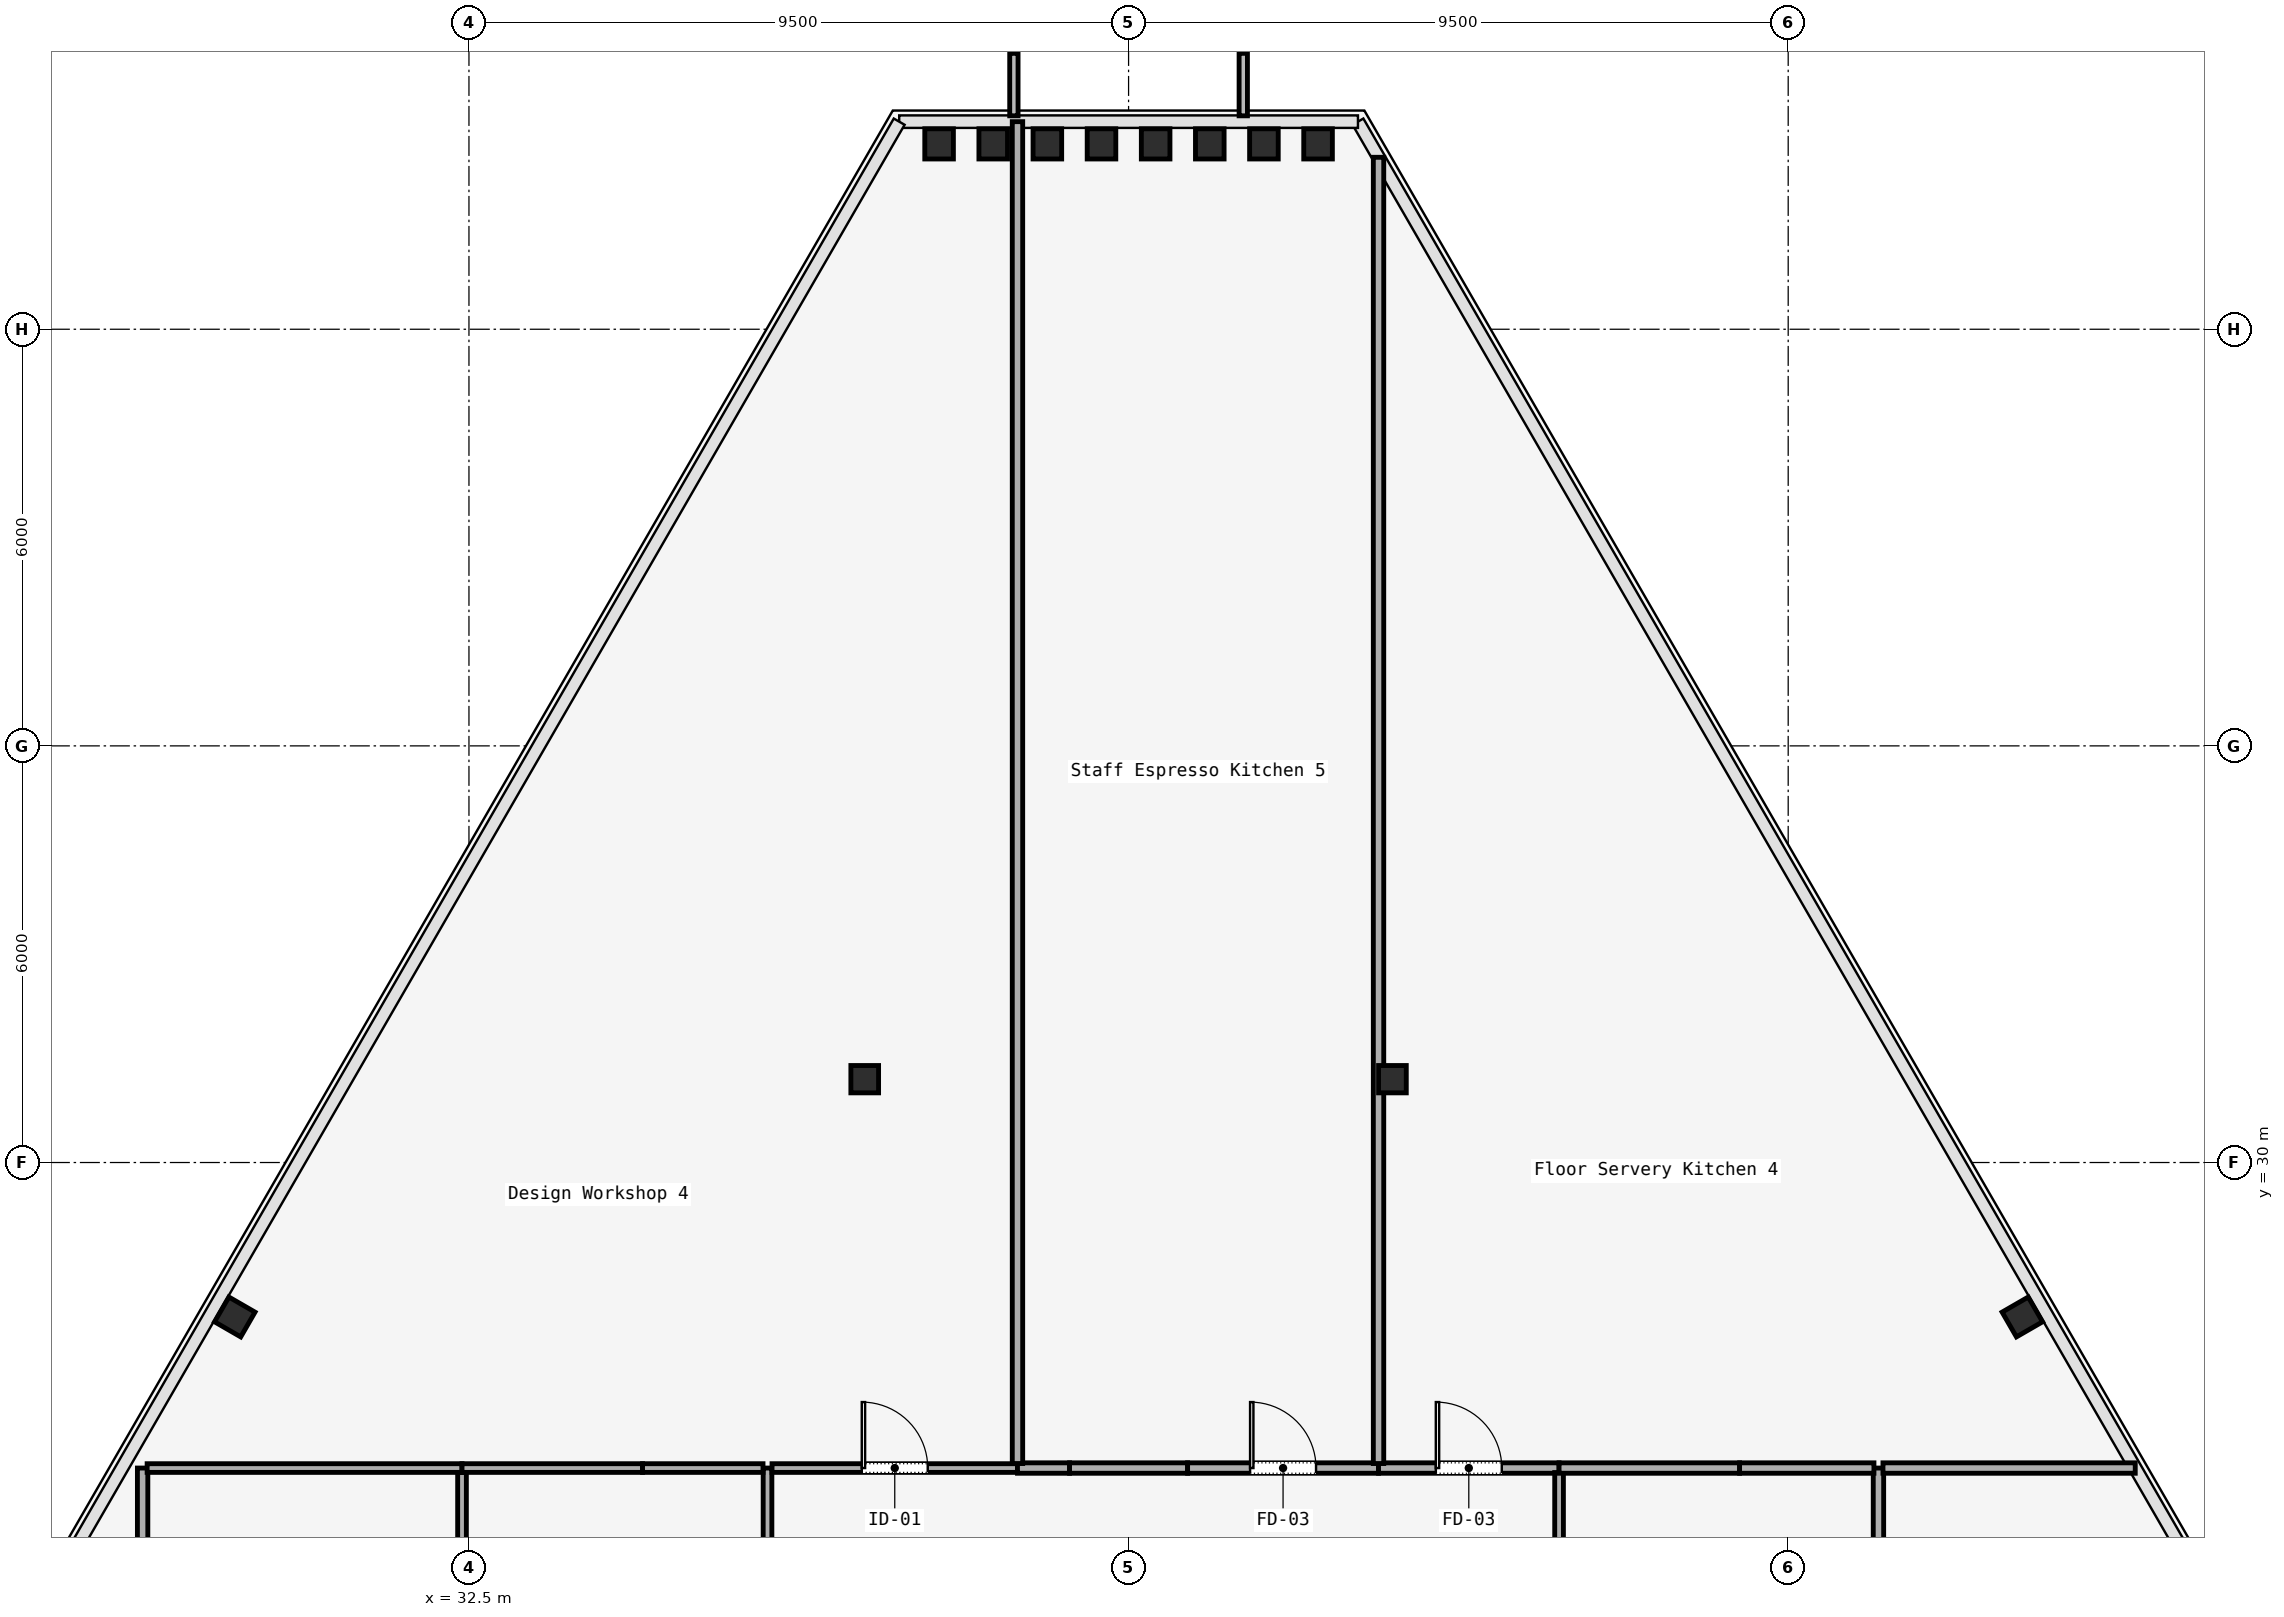
"""IFC4 building model, lengths in metres.
Left out: names, types, materials, properties, quantities, classifications, styles, units other than length and angle.
Written with IfcOpenShell. Run it as: python <this file> out.ifc"""

import sys

from ifc_helpers import new_model, si_unit, direction, frame, frame_2d, origin, origin_2d, place, context, subcontext, project, spatial, rectangle, i_section, extrude, element, fill, save


model = new_model("IFC4")
c1 = context("Model", 3, precision=1e-05, world=origin(), true_north=direction((0.0, 1.0)))
c2 = subcontext(c1, "Body", "Model", "MODEL_VIEW")
j1 = project(units=[si_unit("LENGTHUNIT", "METRE"), si_unit("PLANEANGLEUNIT", "RADIAN")], contexts=[c1])
p1 = place(None, origin())
s1 = spatial("IfcSite", under=j1, at=p1, CompositionType="ELEMENT")
p2 = place(p1, origin())
s2 = spatial("IfcBuilding", under=s1, at=p2, CompositionType="ELEMENT")
p3 = place(p2, frame((0.0, 0.0, 240.8)))
s3 = spatial("IfcBuildingStorey", under=s2, at=p3, CompositionType="ELEMENT", Elevation=240.8)
for number, where, z_axis, x_axis in (
    (1, (38.2, 31.2, 0.0), (0.0, 0.0, 1.0), (1.0, 0.0, 0.0)),
    (2, (45.8, 31.2, 0.0), (0.0, 0.0, 1.0), (1.0, 0.0, 0.0)),
):
    element("IfcColumn", number, at=place(p3, frame(where, z_axis=z_axis, x_axis=x_axis)), inside=s3, PredefinedType="COLUMN", context=c2, shape_type="SweptSolid", body=[
        extrude(i_section(OverallWidth=0.399, OverallDepth=0.394, WebThickness=0.023, FlangeThickness=0.037, FilletRadius=0.015, at=origin_2d()), origin(), (0.0, 0.0, 1.0), 3.58),
    ])
for number, where, z_axis, x_axis in (
    (3, (54.873, 27.776, 0.0), (0.0, 0.0, 1.0), (-0.5, 0.866, 0.0)),
    (4, (44.729, 44.67, 0.0), (0.0, 0.0, 1.0), (1.0, 0.0, 0.0)),
    (5, (43.949, 44.67, 0.0), (0.0, 0.0, 1.0), (1.0, 0.0, 0.0)),
    (6, (43.17, 44.67, 0.0), (0.0, 0.0, 1.0), (1.0, 0.0, 0.0)),
    (7, (42.39, 44.67, 0.0), (0.0, 0.0, 1.0), (1.0, 0.0, 0.0)),
    (8, (41.61, 44.67, 0.0), (0.0, 0.0, 1.0), (1.0, 0.0, 0.0)),
    (9, (40.83, 44.67, 0.0), (0.0, 0.0, 1.0), (1.0, 0.0, 0.0)),
    (10, (40.051, 44.67, 0.0), (0.0, 0.0, 1.0), (1.0, 0.0, 0.0)),
    (11, (39.271, 44.67, 0.0), (0.0, 0.0, 1.0), (1.0, 0.0, 0.0)),
    (12, (29.127, 27.776, 0.0), (0.0, 0.0, 1.0), (0.5, 0.866, 0.0)),
):
    element("IfcColumn", number, at=place(p3, frame(where, z_axis=z_axis, x_axis=x_axis)), inside=s3, PredefinedType="COLUMN", context=c2, shape_type="SweptSolid", body=[
        extrude(i_section(OverallWidth=0.412, OverallDepth=0.435, WebThickness=0.036, FlangeThickness=0.044, FilletRadius=0.015, at=origin_2d()), origin(), (0.0, 0.0, 1.0), 3.58),
    ])
p4 = place(p3, frame((36.8, 23.965, 0.0), z_axis=(0.0, 0.0, 1.0), x_axis=(0.0, 1.0, 0.0)))
e13 = element("IfcWall", 13, at=p4, inside=s3, PredefinedType="PARTITIONING", context=c2, shape_type="SweptSolid", body=[
    extrude(rectangle(XDim=1.635, YDim=0.125, at=frame_2d((0.817, 0.0))), origin(), (0.0, 0.0, 1.0), 3.01),
])
p5 = place(p3, frame((36.865, 25.6, 0.0), z_axis=(0.0, 0.0, 1.0), x_axis=(1.0, 0.0, 0.0)))
e14 = element("IfcWall", 14, at=p5, inside=s3, PredefinedType="PARTITIONING", context=c2, shape_type="SweptSolid", body=[
    extrude(rectangle(XDim=3.535, YDim=0.125, at=frame_2d((1.768, 0.0))), origin(), (0.0, 0.0, 1.0), 3.01),
])
p6 = place(p5, frame((1.292, 0.0, 0.0)))
e15 = element("IfcOpeningElement", 15, at=p6, cuts=e14, PredefinedType="OPENING", context=c2, shape_type="SweptSolid", body=[
    extrude(rectangle(XDim=0.95, YDim=2.2, at=frame_2d((0.475, 1.1))), frame((0.0, 0.062, 0.0), z_axis=(0.0, -1.0, 0.0), x_axis=(1.0, 0.0, 0.0)), (0.0, 0.0, 1.0), 0.125),
])
p7 = place(p3, frame((40.4, 25.6, 0.0), z_axis=(0.0, 0.0, 1.0), x_axis=(1.0, 0.0, 0.0)))
e16 = element("IfcWall", 16, at=p7, inside=s3, PredefinedType="PARTITIONING", context=c2, shape_type="SweptSolid", body=[
    extrude(rectangle(XDim=0.75, YDim=0.15, at=frame_2d((0.375, 0.0))), origin(), (0.0, 0.0, 1.0), 3.01),
])
p8 = place(p3, frame((41.15, 25.6, 0.0), z_axis=(0.0, 0.0, 1.0), x_axis=(1.0, 0.0, 0.0)))
e17 = element("IfcWall", 17, at=p8, inside=s3, PredefinedType="PARTITIONING", context=c2, shape_type="SweptSolid", body=[
    extrude(rectangle(XDim=1.7, YDim=0.15, at=frame_2d((0.85, 0.0))), origin(), (0.0, 0.0, 1.0), 3.01),
])
p9 = place(p3, frame((42.85, 25.6, 0.0), z_axis=(0.0, 0.0, 1.0), x_axis=(1.0, 0.0, 0.0)))
e18 = element("IfcWall", 18, at=p9, inside=s3, PredefinedType="PARTITIONING", context=c2, shape_type="SweptSolid", body=[
    extrude(rectangle(XDim=2.75, YDim=0.15, at=frame_2d((1.375, 0.0))), origin(), (0.0, 0.0, 1.0), 3.01),
])
p10 = place(p9, frame((0.9, 0.0, 0.0)))
e19 = element("IfcOpeningElement", 19, at=p10, cuts=e18, PredefinedType="OPENING", context=c2, shape_type="SweptSolid", body=[
    extrude(rectangle(XDim=0.95, YDim=2.2, at=frame_2d((0.475, 1.1))), frame((0.0, 0.075, 0.0), z_axis=(0.0, -1.0, 0.0), x_axis=(1.0, 0.0, 0.0)), (0.0, 0.0, 1.0), 0.15),
])
p11 = place(p3, frame((45.6, 25.6, 0.0), z_axis=(0.0, 0.0, 1.0), x_axis=(1.0, 0.0, 0.0)))
e20 = element("IfcWall", 20, at=p11, inside=s3, PredefinedType="PARTITIONING", context=c2, shape_type="SweptSolid", body=[
    extrude(rectangle(XDim=2.6, YDim=0.15, at=frame_2d((1.3, 0.0))), origin(), (0.0, 0.0, 1.0), 3.01),
])
p12 = place(p11, frame((0.825, 0.0, 0.0)))
e21 = element("IfcOpeningElement", 21, at=p12, cuts=e20, PredefinedType="OPENING", context=c2, shape_type="SweptSolid", body=[
    extrude(rectangle(XDim=0.95, YDim=2.2, at=frame_2d((0.475, 1.1))), frame((0.0, 0.075, 0.0), z_axis=(0.0, -1.0, 0.0), x_axis=(1.0, 0.0, 0.0)), (0.0, 0.0, 1.0), 0.15),
])
p13 = place(p3, frame((48.2, 25.535, 0.0), z_axis=(0.0, 0.0, 1.0), x_axis=(0.0, -1.0, 0.0)))
e22 = element("IfcWall", 22, at=p13, inside=s3, PredefinedType="PARTITIONING", context=c2, shape_type="SweptSolid", body=[
    extrude(rectangle(XDim=1.635, YDim=0.125, at=frame_2d((0.817, 0.0))), origin(), (0.0, 0.0, 1.0), 3.01),
])
for number, where, z_axis, x_axis in (
    (23, (27.8, 25.6, 0.0), (0.0, 0.0, 1.0), (0.0, -1.0, 0.0)),
    (24, (52.8, 17.065, 0.0), (0.0, 0.0, 1.0), (0.0, 1.0, 0.0)),
):
    element("IfcWall", number, at=place(p3, frame(where, z_axis=z_axis, x_axis=x_axis)), inside=s3, PredefinedType="PARTITIONING", context=c2, shape_type="SweptSolid", body=[
        extrude(rectangle(XDim=8.535, YDim=0.15, at=frame_2d((4.268, 0.0))), origin(), (0.0, 0.0, 1.0), 3.01),
    ])
p14 = place(p3, frame((52.865, 25.6, 0.0), z_axis=(0.0, 0.0, 1.0), x_axis=(1.0, 0.0, 0.0)))
e25 = element("IfcWall", 25, at=p14, inside=s3, PredefinedType="PARTITIONING", context=c2, shape_type="SweptSolid", body=[
    extrude(rectangle(XDim=3.633, YDim=0.15, at=frame_2d((1.817, 0.0))), origin(), (0.0, 0.0, 1.0), 3.01),
])
p15 = place(p3, frame((27.865, 25.6, 0.0), z_axis=(0.0, 0.0, 1.0), x_axis=(1.0, 0.0, 0.0)))
e26 = element("IfcWall", 26, at=p15, inside=s3, PredefinedType="PARTITIONING", context=c2, shape_type="SweptSolid", body=[
    extrude(rectangle(XDim=4.535, YDim=0.125, at=frame_2d((2.268, 0.0))), origin(), (0.0, 0.0, 1.0), 3.01),
])
p16 = place(p3, frame((32.4, 25.535, 0.0), z_axis=(0.0, 0.0, 1.0), x_axis=(0.0, -1.0, 0.0)))
e27 = element("IfcWall", 27, at=p16, inside=s3, PredefinedType="PARTITIONING", context=c2, shape_type="SweptSolid", body=[
    extrude(rectangle(XDim=8.47, YDim=0.125, at=frame_2d((4.235, 0.0))), origin(), (0.0, 0.0, 1.0), 3.01),
])
p17 = place(p3, frame((32.4, 25.6, 0.0), z_axis=(0.0, 0.0, 1.0), x_axis=(1.0, 0.0, 0.0)))
e28 = element("IfcWall", 28, at=p17, inside=s3, PredefinedType="PARTITIONING", context=c2, shape_type="SweptSolid", body=[
    extrude(rectangle(XDim=2.6, YDim=0.125, at=frame_2d((1.3, 0.0))), origin(), (0.0, 0.0, 1.0), 3.01),
])
p18 = place(p3, frame((35.0, 25.6, 0.0), z_axis=(0.0, 0.0, 1.0), x_axis=(1.0, 0.0, 0.0)))
e29 = element("IfcWall", 29, at=p18, inside=s3, PredefinedType="PARTITIONING", context=c2, shape_type="SweptSolid", body=[
    extrude(rectangle(XDim=1.735, YDim=0.125, at=frame_2d((0.868, 0.0))), origin(), (0.0, 0.0, 1.0), 3.01),
])
p19 = place(p3, frame((48.2, 25.6, 0.0), z_axis=(0.0, 0.0, 1.0), x_axis=(1.0, 0.0, 0.0)))
e30 = element("IfcWall", 30, at=p19, inside=s3, PredefinedType="PARTITIONING", context=c2, shape_type="SweptSolid", body=[
    extrude(rectangle(XDim=2.6, YDim=0.15, at=frame_2d((1.3, 0.0))), origin(), (0.0, 0.0, 1.0), 3.01),
])
p20 = place(p3, frame((50.8, 25.6, 0.0), z_axis=(0.0, 0.0, 1.0), x_axis=(1.0, 0.0, 0.0)))
e31 = element("IfcWall", 31, at=p20, inside=s3, PredefinedType="PARTITIONING", context=c2, shape_type="SweptSolid", body=[
    extrude(rectangle(XDim=1.935, YDim=0.15, at=frame_2d((0.968, 0.0))), origin(), (0.0, 0.0, 1.0), 3.01),
])
p21 = place(p3, frame((45.6, 25.665, 0.0), z_axis=(0.0, 0.0, 1.0), x_axis=(0.0, 1.0, 0.0)))
e32 = element("IfcWall", 32, at=p21, inside=s3, PredefinedType="PARTITIONING", context=c2, shape_type="SweptSolid", body=[
    extrude(rectangle(XDim=18.811, YDim=0.15, at=frame_2d((9.406, 0.0))), origin(), (0.0, 0.0, 1.0), 3.01),
])
p22 = place(p3, frame((40.4, 44.99, 0.0), z_axis=(0.0, 0.0, 1.0), x_axis=(0.0, -1.0, 0.0)))
e33 = element("IfcWall", 33, at=p22, inside=s3, PredefinedType="PARTITIONING", context=c2, shape_type="SweptSolid", body=[
    extrude(rectangle(XDim=19.324, YDim=0.15, at=frame_2d((9.662, 0.0))), origin(), (0.0, 0.0, 1.0), 3.01),
])
p23 = place(p12, origin())
e34 = element("IfcDoor", 34, at=p23, inside=s3, OperationType="SINGLE_SWING_LEFT", PredefinedType="DOOR", context=c2, shape_type="SweptSolid", body=[
    extrude(rectangle(XDim=0.95, YDim=2.2, at=frame_2d((0.475, 1.1))), frame((0.0, 0.025, 0.0), z_axis=(0.0, -1.0, 0.0), x_axis=(1.0, 0.0, 0.0)), (0.0, 0.0, 1.0), 0.05),
])
fill(e21, e34)
p24 = place(p6, origin())
e35 = element("IfcDoor", 35, at=p24, inside=s3, OperationType="SINGLE_SWING_RIGHT", PredefinedType="DOOR", context=c2, shape_type="SweptSolid", body=[
    extrude(rectangle(XDim=0.95, YDim=2.2, at=frame_2d((0.475, 1.1))), frame((0.0, 0.025, 0.0), z_axis=(0.0, -1.0, 0.0), x_axis=(1.0, 0.0, 0.0)), (0.0, 0.0, 1.0), 0.05),
])
fill(e15, e35)
p25 = place(p10, origin())
e36 = element("IfcDoor", 36, at=p25, inside=s3, OperationType="SINGLE_SWING_LEFT", PredefinedType="DOOR", context=c2, shape_type="SweptSolid", body=[
    extrude(rectangle(XDim=0.95, YDim=2.2, at=frame_2d((0.475, 1.1))), frame((0.0, 0.025, 0.0), z_axis=(0.0, -1.0, 0.0), x_axis=(1.0, 0.0, 0.0)), (0.0, 0.0, 1.0), 0.05),
])
fill(e19, e36)
save(model, sys.argv[1])
